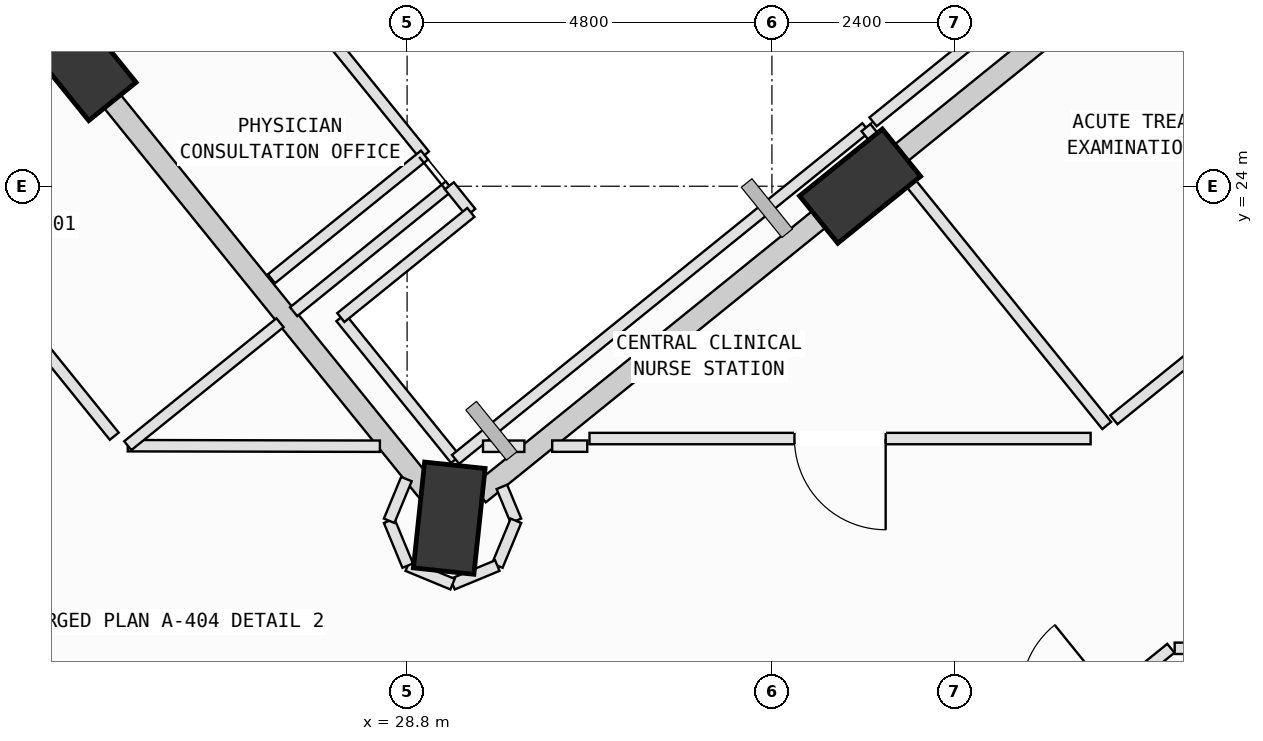
"""IFC4 building model, lengths in metres.
Left out: names, types, materials, properties, quantities, classifications, styles, units other than length and angle.
Written with IfcOpenShell. Run it as: python <this file> out.ifc"""

import sys

from ifc_helpers import new_model, si_unit, direction, frame, frame_2d, origin, origin_2d, place, context, subcontext, project, spatial, rectangle, extrude, element, fill, save


model = new_model("IFC4")
c1 = context("Model", 3, precision=1e-05, world=origin(), true_north=direction((0.0, 1.0)))
c2 = subcontext(c1, "Body", "Model", "MODEL_VIEW")
j1 = project(units=[si_unit("LENGTHUNIT", "METRE"), si_unit("PLANEANGLEUNIT", "RADIAN")], contexts=[c1])
p1 = place(None, origin())
s1 = spatial("IfcSite", under=j1, at=p1, CompositionType="ELEMENT")
p2 = place(p1, origin())
s2 = spatial("IfcBuilding", under=s1, at=p2, CompositionType="ELEMENT")
p3 = place(p2, frame((0.0, 0.0, 189.8)))
s3 = spatial("IfcBuildingStorey", under=s2, at=p3, CompositionType="ELEMENT", Elevation=189.8)
p4 = place(p3, frame((34.76, 24.001, 0.002), z_axis=(0.003237771962, 0.004887202961, 0.999982815892), x_axis=(-0.995513971881, -0.094542846934, 0.003685360637)))
e1 = element("IfcColumn", 1, at=p4, inside=s3, PredefinedType="COLUMN", context=c2, shape_type="SweptSolid", body=[
    extrude(rectangle(XDim=1.4, YDim=0.8, at=origin_2d()), origin(), (0.0, 0.0, 1.0), 3.996),
])
p5 = place(p3, frame((29.355, 19.633, 0.002), z_axis=(0.021556852315, -0.017465325105, 0.999615058179), x_axis=(-0.70601495746, 0.707659307079, 0.027589580415)))
e2 = element("IfcColumn", 2, at=p5, inside=s3, PredefinedType="COLUMN", context=c2, shape_type="SweptSolid", body=[
    extrude(rectangle(XDim=1.4, YDim=0.8, at=origin_2d()), origin(), (0.0, 0.0, 1.0), 3.998),
])
p6 = place(p3, frame((24.483, 25.66, 0.002), z_axis=(-0.003235498094, -0.037788175848, 0.999280533843), x_axis=(-0.560052946026, 0.827931598079, 0.029495195374)))
e3 = element("IfcColumn", 3, at=p6, inside=s3, PredefinedType="COLUMN", context=c2, shape_type="SweptSolid", body=[
    extrude(rectangle(XDim=1.4, YDim=0.8, at=origin_2d()), origin(), (0.0, 0.0, 1.0), 3.999),
])
p7 = place(p3, frame((35.154, 24.321, 0.0), z_axis=(0.0, 0.0, 1.0), x_axis=(0.7776950364, 0.628641734503, 0.0)))
e4 = element("IfcWall", 4, at=p7, inside=s3, PredefinedType="SOLIDWALL", context=c2, shape_type="SweptSolid", body=[
    extrude(rectangle(XDim=6.211, YDim=0.28, at=frame_2d((3.105, 0.0))), origin(), (0.0, 0.0, 1.0), 3.265),
])
p8 = place(p7, frame((2.588, 0.0, 0.75)))
e5 = element("IfcOpeningElement", 5, at=p8, cuts=e4, PredefinedType="OPENING", context=c2, shape_type="SweptSolid", body=[
    extrude(rectangle(XDim=1.4, YDim=1.85, at=frame_2d((0.7, 0.925))), frame((0.0, 0.15, 0.0), z_axis=(0.0, -1.0, 0.0), x_axis=(1.0, 0.0, 0.0)), (0.0, 0.0, 1.0), 0.3),
])
p9 = place(p3, frame((29.747, 19.95, 0.0), z_axis=(0.0, 0.0, 1.0), x_axis=(0.777717798176, 0.628613574782, 0.0)))
e6 = element("IfcWall", 6, at=p9, inside=s3, PredefinedType="SOLIDWALL", context=c2, shape_type="SweptSolid", body=[
    extrude(rectangle(XDim=5.96, YDim=0.28, at=frame_2d((2.98, 0.0))), origin(), (0.0, 0.0, 1.0), 3.265),
])
p10 = place(p3, frame((29.077, 19.976, 0.0), z_axis=(0.0, 0.0, 1.0), x_axis=(-0.628642221387, 0.777694642832, 0.0)))
e7 = element("IfcWall", 7, at=p10, inside=s3, PredefinedType="SOLIDWALL", context=c2, shape_type="SweptSolid", body=[
    extrude(rectangle(XDim=6.76, YDim=0.28, at=frame_2d((3.38, 0.0))), origin(), (0.0, 0.0, 1.0), 3.265),
])
p11 = place(p3, frame((35.725, 15.396, 0.0), z_axis=(0.0, 0.0, 1.0), x_axis=(0.777858887674, 0.628438979429, 0.0)))
e8 = element("IfcWall", 8, at=p11, inside=s3, PredefinedType="PARTITIONING", context=c2, shape_type="SweptSolid", body=[
    extrude(rectangle(XDim=4.016, YDim=0.15, at=frame_2d((2.008, 0.0))), origin(), (0.0, 0.0, 1.0), 3.78),
])
p12 = place(p11, frame((1.821, 0.0, 0.0)))
e9 = element("IfcOpeningElement", 9, at=p12, cuts=e8, PredefinedType="OPENING", context=c2, shape_type="SweptSolid", body=[
    extrude(rectangle(XDim=1.2, YDim=2.15, at=frame_2d((0.6, 1.075))), frame((0.0, 0.085, 0.0), z_axis=(0.0, -1.0, 0.0), x_axis=(1.0, 0.0, 0.0)), (0.0, 0.0, 1.0), 0.17),
])
p13 = place(p3, frame((38.899, 17.92, 0.0), z_axis=(0.0, 0.0, 1.0), x_axis=(1.0, 0.0, 0.0)))
e10 = element("IfcWall", 10, at=p13, inside=s3, PredefinedType="PARTITIONING", context=c2, shape_type="SweptSolid", body=[
    extrude(rectangle(XDim=2.291, YDim=0.15, at=frame_2d((1.146, 0.0))), origin(), (0.0, 0.0, 1.0), 3.78),
])
p14 = place(p3, frame((27.928, 22.272, 0.0), z_axis=(0.0, 0.0, 1.0), x_axis=(0.628817696096, -0.777552766747, 0.0)))
e11 = element("IfcWall", 11, at=p14, inside=s3, PredefinedType="PARTITIONING", context=c2, shape_type="SweptSolid", body=[
    extrude(rectangle(XDim=2.4, YDim=0.15, at=frame_2d((1.2, 0.0))), origin(), (0.0, 0.0, 1.0), 3.78),
])
p15 = place(p3, frame((29.437, 20.406, 0.0), z_axis=(0.0, 0.0, 1.0), x_axis=(0.777692568026, 0.628644788125, 0.0)))
e12 = element("IfcWall", 12, at=p15, inside=s3, PredefinedType="PARTITIONING", context=c2, shape_type="SweptSolid", body=[
    extrude(rectangle(XDim=6.944, YDim=0.15, at=frame_2d((3.472, 0.0))), origin(), (0.0, 0.0, 1.0), 3.78),
])
p16 = place(p3, frame((34.837, 24.771, 0.0), z_axis=(0.0, 0.0, 1.0), x_axis=(0.628729378475, -0.777624182136, 0.0)))
e13 = element("IfcWall", 13, at=p16, inside=s3, PredefinedType="PARTITIONING", context=c2, shape_type="SweptSolid", body=[
    extrude(rectangle(XDim=0.435, YDim=0.15, at=frame_2d((0.217, 0.0))), origin(), (0.0, 0.0, 1.0), 3.78),
])
p17 = place(p3, frame((35.255, 24.254, 0.0), z_axis=(0.0, 0.0, 1.0), x_axis=(0.628661828858, -0.777678792907, 0.0)))
e14 = element("IfcWall", 14, at=p17, inside=s3, PredefinedType="PARTITIONING", context=c2, shape_type="SweptSolid", body=[
    extrude(rectangle(XDim=4.374, YDim=0.15, at=frame_2d((2.187, 0.0))), origin(), (0.0, 0.0, 1.0), 3.78),
])
p18 = place(p3, frame((37.793, 20.68, 0.0), z_axis=(0.0, 0.0, 1.0), x_axis=(-1.0, 0.0, 0.0)))
e15 = element("IfcWall", 15, at=p18, inside=s3, PredefinedType="PARTITIONING", context=c2, shape_type="SweptSolid", body=[
    extrude(rectangle(XDim=6.593, YDim=0.15, at=frame_2d((3.296, 0.0))), origin(), (0.0, 0.0, 1.0), 3.415),
])
p19 = place(p18, frame((2.697, 0.0, 0.0)))
e16 = element("IfcOpeningElement", 16, at=p19, cuts=e15, PredefinedType="OPENING", context=c2, shape_type="SweptSolid", body=[
    extrude(rectangle(XDim=1.2, YDim=2.15, at=frame_2d((0.6, 1.075))), frame((0.0, 0.085, 0.0), z_axis=(0.0, -1.0, 0.0), x_axis=(1.0, 0.0, 0.0)), (0.0, 0.0, 1.0), 0.17),
])
p20 = place(p3, frame((31.17, 20.58, 0.0), z_axis=(0.0, 0.0, 1.0), x_axis=(-1.0, 0.0, 0.0)))
e17 = element("IfcWall", 17, at=p20, inside=s3, PredefinedType="PARTITIONING", context=c2, shape_type="SweptSolid", body=[
    extrude(rectangle(XDim=0.461, YDim=0.15, at=frame_2d((0.23, 0.0))), origin(), (0.0, 0.0, 1.0), 3.78),
])
p21 = place(p3, frame((30.343, 20.579, 0.0), z_axis=(0.0, 0.0, 1.0), x_axis=(-1.0, 0.0, 0.0)))
e18 = element("IfcWall", 18, at=p21, inside=s3, PredefinedType="PARTITIONING", context=c2, shape_type="SweptSolid", body=[
    extrude(rectangle(XDim=0.544, YDim=0.15, at=frame_2d((0.272, 0.0))), origin(), (0.0, 0.0, 1.0), 3.78),
])
p22 = place(p3, frame((30.047, 20.044, 0.0), z_axis=(0.0, 0.0, 1.0), x_axis=(0.382783485813, -0.923838082669, 0.0)))
e19 = element("IfcWall", 19, at=p22, inside=s3, PredefinedType="PARTITIONING", context=c2, shape_type="SweptSolid", body=[
    extrude(rectangle(XDim=0.483, YDim=0.15, at=frame_2d((0.241, 0.0))), origin(), (0.0, 0.0, 1.0), 3.78),
])
p23 = place(p3, frame((30.232, 19.598, 0.0), z_axis=(0.0, 0.0, 1.0), x_axis=(-0.383420739437, -0.923573785125, 0.0)))
e20 = element("IfcWall", 20, at=p23, inside=s3, PredefinedType="PARTITIONING", context=c2, shape_type="SweptSolid", body=[
    extrude(rectangle(XDim=0.639, YDim=0.15, at=frame_2d((0.319, 0.0))), origin(), (0.0, 0.0, 1.0), 3.78),
])
p24 = place(p3, frame((29.987, 19.008, 0.0), z_axis=(0.0, 0.0, 1.0), x_axis=(-0.923811477415, -0.382847690599, 0.0)))
e21 = element("IfcWall", 21, at=p24, inside=s3, PredefinedType="PARTITIONING", context=c2, shape_type="SweptSolid", body=[
    extrude(rectangle(XDim=0.638, YDim=0.15, at=frame_2d((0.319, 0.0))), origin(), (0.0, 0.0, 1.0), 3.415),
])
for number, where, z_axis, x_axis in (
    (22, (29.398, 18.764, 0.0), (0.0, 0.0, 1.0), (-0.924, 0.382, 0.0)),
    (23, (28.808, 19.008, 0.0), (0.0, 0.0, 1.0), (-0.382, 0.924, 0.0)),
):
    element("IfcWall", number, at=place(p3, frame(where, z_axis=z_axis, x_axis=x_axis)), inside=s3, PredefinedType="PARTITIONING", context=c2, shape_type="SweptSolid", body=[
        extrude(rectangle(XDim=0.638, YDim=0.15, at=frame_2d((0.319, 0.0))), origin(), (0.0, 0.0, 1.0), 3.78),
    ])
p25 = place(p3, frame((28.564, 19.598, 0.0), z_axis=(0.0, 0.0, 1.0), x_axis=(0.382134027661, 0.924106912053, 0.0)))
e24 = element("IfcWall", 24, at=p25, inside=s3, PredefinedType="PARTITIONING", context=c2, shape_type="SweptSolid", body=[
    extrude(rectangle(XDim=0.594, YDim=0.15, at=frame_2d((0.297, 0.0))), origin(), (0.0, 0.0, 1.0), 3.78),
])
p26 = place(p3, frame((28.442, 20.579, 0.0), z_axis=(0.0, 0.0, 1.0), x_axis=(-0.999997876259, 0.002060940714, 0.0)))
e25 = element("IfcWall", 25, at=p26, inside=s3, PredefinedType="PARTITIONING", context=c2, shape_type="SweptSolid", body=[
    extrude(rectangle(XDim=3.317, YDim=0.15, at=frame_2d((1.658, 0.0))), origin(), (0.0, 0.0, 1.0), 3.78),
])
p27 = place(p3, frame((25.125, 20.586, 0.0), z_axis=(0.0, 0.0, 1.0), x_axis=(0.777862741632, 0.62843420911, 0.0)))
e26 = element("IfcWall", 26, at=p27, inside=s3, PredefinedType="PARTITIONING", context=c2, shape_type="SweptSolid", body=[
    extrude(rectangle(XDim=2.575, YDim=0.15, at=frame_2d((1.288, 0.0))), origin(), (0.0, 0.0, 1.0), 3.78),
])
p28 = place(p3, frame((27.307, 22.349, 0.0), z_axis=(0.0, 0.0, 1.0), x_axis=(0.777803521149, 0.628507503924, 0.0)))
e27 = element("IfcWall", 27, at=p28, inside=s3, PredefinedType="PARTITIONING", context=c2, shape_type="SweptSolid", body=[
    extrude(rectangle(XDim=2.635, YDim=0.15, at=frame_2d((1.317, 0.0))), origin(), (0.0, 0.0, 1.0), 3.78),
])
p29 = place(p3, frame((29.356, 24.005, 0.0), z_axis=(0.0, 0.0, 1.0), x_axis=(0.628854778526, -0.77752277621, 0.0)))
e28 = element("IfcWall", 28, at=p29, inside=s3, PredefinedType="PARTITIONING", context=c2, shape_type="SweptSolid", body=[
    extrude(rectangle(XDim=0.45, YDim=0.15, at=frame_2d((0.225, 0.0))), origin(), (0.0, 0.0, 1.0), 3.78),
])
p30 = place(p3, frame((29.639, 23.655, 0.0), z_axis=(0.0, 0.0, 1.0), x_axis=(-0.777686587847, -0.628652186095, 0.0)))
e29 = element("IfcWall", 29, at=p30, inside=s3, PredefinedType="PARTITIONING", context=c2, shape_type="SweptSolid", body=[
    extrude(rectangle(XDim=2.2, YDim=0.15, at=frame_2d((1.1, 0.0))), origin(), (0.0, 0.0, 1.0), 3.78),
])
p31 = place(p3, frame((46.52, 27.734, 0.0), z_axis=(0.0, 0.0, 1.0), x_axis=(-0.777697805965, -0.628638308248, 0.0)))
e30 = element("IfcWall", 30, at=p31, inside=s3, PredefinedType="PARTITIONING", context=c2, shape_type="SweptSolid", body=[
    extrude(rectangle(XDim=10.828, YDim=0.15, at=frame_2d((5.414, 0.0))), origin(), (0.0, 0.0, 1.0), 3.065),
])
p32 = place(p31, frame((4.814, 0.0, 0.0)))
e31 = element("IfcOpeningElement", 31, at=p32, cuts=e30, PredefinedType="OPENING", context=c2, shape_type="SweptSolid", body=[
    extrude(rectangle(XDim=1.2, YDim=2.15, at=frame_2d((0.6, 1.075))), frame((0.0, 0.085, 0.0), z_axis=(0.0, -1.0, 0.0), x_axis=(1.0, 0.0, 0.0)), (0.0, 0.0, 1.0), 0.17),
])
p33 = place(p3, frame((34.93, 24.847, 0.0), z_axis=(0.0, 0.0, 1.0), x_axis=(0.777695693254, 0.628640921906, 0.0)))
e32 = element("IfcWall", 32, at=p33, inside=s3, PredefinedType="PARTITIONING", context=c2, shape_type="SweptSolid", body=[
    extrude(rectangle(XDim=10.828, YDim=0.15, at=frame_2d((5.414, 0.0))), origin(), (0.0, 0.0, 1.0), 3.265),
])
p34 = place(p3, frame((24.947, 20.711, 0.0), z_axis=(0.0, 0.0, 1.0), x_axis=(-0.628604529082, 0.777725109545, 0.0)))
e33 = element("IfcWall", 33, at=p34, inside=s3, PredefinedType="PARTITIONING", context=c2, shape_type="SweptSolid", body=[
    extrude(rectangle(XDim=4.781, YDim=0.15, at=frame_2d((2.39, 0.0))), origin(), (0.0, 0.0, 1.0), 3.415),
])
p35 = place(p34, frame((1.89, 0.0, 0.0)))
e34 = element("IfcOpeningElement", 34, at=p35, cuts=e33, PredefinedType="OPENING", context=c2, shape_type="SweptSolid", body=[
    extrude(rectangle(XDim=1.0, YDim=2.12, at=frame_2d((0.5, 1.06))), frame((0.0, 0.085, 0.0), z_axis=(0.0, -1.0, 0.0), x_axis=(1.0, 0.0, 0.0)), (0.0, 0.0, 1.0), 0.17),
])
p36 = place(p3, frame((25.113, 29.255, 0.0), z_axis=(0.0, 0.0, 1.0), x_axis=(0.628606171211, -0.777723782275, 0.0)))
e35 = element("IfcWall", 35, at=p36, inside=s3, PredefinedType="PARTITIONING", context=c2, shape_type="SweptSolid", body=[
    extrude(rectangle(XDim=6.23, YDim=0.15, at=frame_2d((3.115, 0.0))), origin(), (0.0, 0.0, 1.0), 3.78),
])
p37 = place(p3, frame((29.029, 24.41, 0.0), z_axis=(0.0, 0.0, 1.0), x_axis=(-0.777732003351, -0.628595999799, 0.0)))
e36 = element("IfcWall", 36, at=p37, inside=s3, PredefinedType="PARTITIONING", context=c2, shape_type="SweptSolid", body=[
    extrude(rectangle(XDim=2.59, YDim=0.15, at=frame_2d((1.295, 0.0))), origin(), (0.0, 0.0, 1.0), 3.78),
])
p38 = place(p19, origin())
e37 = element("IfcDoor", 37, at=p38, inside=s3, OperationType="SINGLE_SWING_LEFT", PredefinedType="DOOR", context=c2, shape_type="SweptSolid", body=[
    extrude(rectangle(XDim=1.2, YDim=2.15, at=frame_2d((0.6, 1.075))), frame((0.0, 0.025, 0.0), z_axis=(0.0, -1.0, 0.0), x_axis=(1.0, 0.0, 0.0)), (0.0, 0.0, 1.0), 0.05),
])
fill(e16, e37)
save(model, sys.argv[1])
